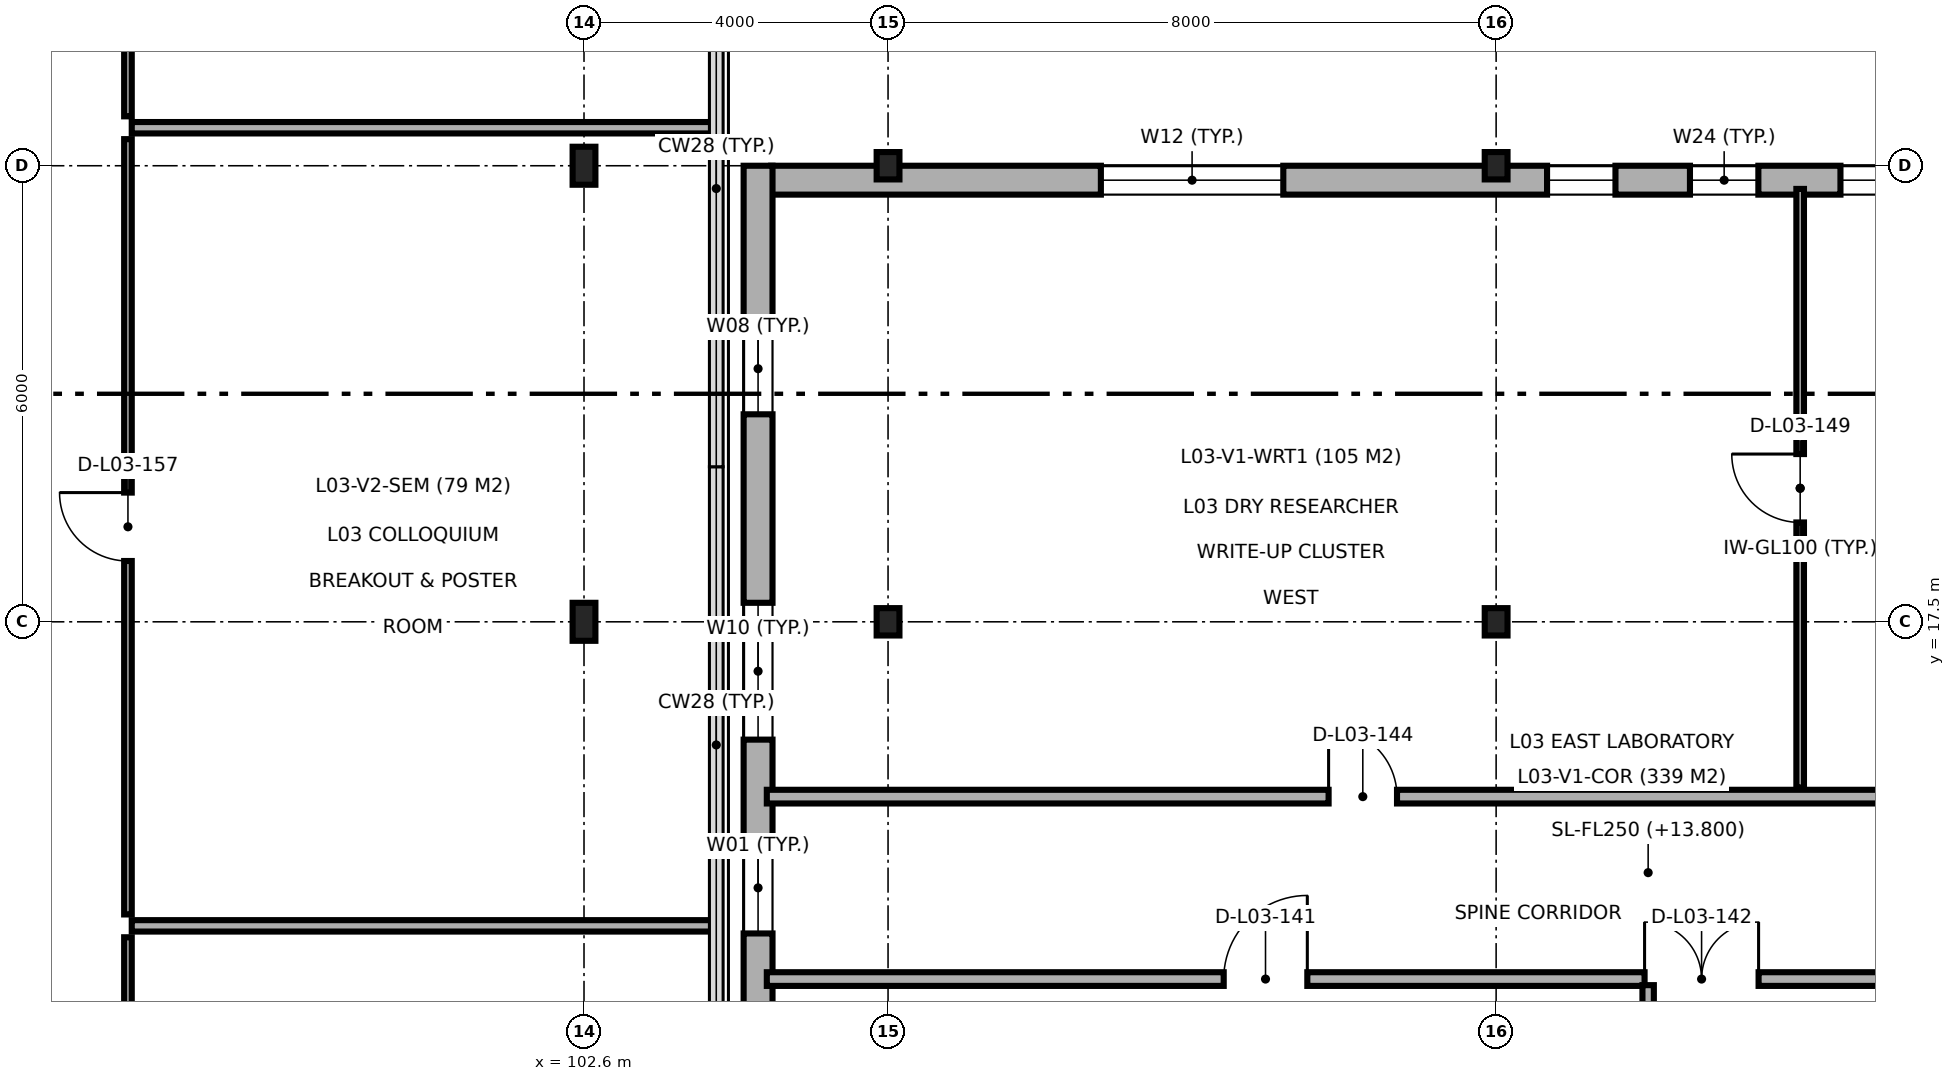
"""IFC4 building model, lengths in metres.
Left out: names, types, materials, properties, quantities, classifications, styles, units other than length and angle.
Written with IfcOpenShell. Run it as: python <this file> out.ifc"""

import sys

from ifc_helpers import new_model, si_unit, direction, frame, frame_2d, origin, origin_2d, place, context, subcontext, project, spatial, rectangle, i_section, extrude, element, fill, save


model = new_model("IFC4")
c1 = context("Model", 3, precision=1e-05, world=origin(), true_north=direction((0.0, 1.0)))
c2 = subcontext(c1, "Body", "Model", "MODEL_VIEW")
j1 = project(units=[si_unit("LENGTHUNIT", "METRE"), si_unit("PLANEANGLEUNIT", "RADIAN")], contexts=[c1])
p1 = place(None, origin())
s1 = spatial("IfcSite", under=j1, at=p1, CompositionType="ELEMENT")
p2 = place(p1, origin())
s2 = spatial("IfcBuilding", under=s1, at=p2, CompositionType="ELEMENT")
p3 = place(p2, frame((0.0, 0.0, 13.8)))
s3 = spatial("IfcBuildingStorey", under=s2, at=p3, CompositionType="ELEMENT", Elevation=13.8)
p4 = place(p3, frame((102.6, 17.5, 0.0), z_axis=(0.0, 0.0, 1.0), x_axis=(1.0, 0.0, 0.0)))
e1 = element("IfcColumn", 1, at=p4, inside=s3, PredefinedType="COLUMN", context=c2, shape_type="SweptSolid", body=[
    extrude(i_section(OverallWidth=0.3, OverallDepth=0.5, WebThickness=0.014, FlangeThickness=0.028, FilletRadius=0.027, at=origin_2d()), origin(), (0.0, 0.0, 1.0), 6.318),
])
p5 = place(p3, frame((102.6, 23.5, 0.0), z_axis=(0.0, 0.0, 1.0), x_axis=(1.0, 0.0, 0.0)))
e2 = element("IfcColumn", 2, at=p5, inside=s3, PredefinedType="COLUMN", context=c2, shape_type="SweptSolid", body=[
    extrude(i_section(OverallWidth=0.3, OverallDepth=0.5, WebThickness=0.014, FlangeThickness=0.028, FilletRadius=0.027, at=origin_2d()), origin(), (0.0, 0.0, 1.0), 6.978),
])
for number, where, z_axis, x_axis in (
    (3, (106.6, 17.5, 0.0), (0.0, 0.0, 1.0), (1.0, 0.0, 0.0)),
    (4, (106.6, 23.5, 0.0), (0.0, 0.0, 1.0), (1.0, 0.0, 0.0)),
    (5, (114.6, 17.5, 0.0), (0.0, 0.0, 1.0), (1.0, 0.0, 0.0)),
    (6, (114.6, 23.5, 0.0), (0.0, 0.0, 1.0), (1.0, 0.0, 0.0)),
):
    element("IfcColumn", number, at=place(p3, frame(where, z_axis=z_axis, x_axis=x_axis)), inside=s3, PredefinedType="COLUMN", context=c2, shape_type="SweptSolid", body=[
        extrude(i_section(OverallWidth=0.3, OverallDepth=0.36, WebThickness=0.012, FlangeThickness=0.022, FilletRadius=0.027, at=origin_2d()), origin(), (0.0, 0.0, 1.0), 4.5),
    ])
p6 = place(p3, frame((138.962, 23.31, 0.0), z_axis=(0.0, 0.0, 1.0), x_axis=(-1.0, 0.0, 0.0)))
e7 = element("IfcWall", 7, at=p6, inside=s3, PredefinedType="SOLIDWALL", context=c2, shape_type="SweptSolid", body=[
    extrude(rectangle(XDim=33.9, YDim=0.38, at=frame_2d((16.95, 0.0))), origin(), (0.0, 0.0, 1.0), 4.24),
])
p7 = place(p6, frame((3.182, 0.0, 0.9)))
e8 = element("IfcOpeningElement", 8, at=p7, cuts=e7, PredefinedType="OPENING", context=c2, shape_type="SweptSolid", body=[
    extrude(rectangle(XDim=2.2, YDim=1.65, at=frame_2d((1.1, 0.825))), frame((0.0, 0.2, 0.0), z_axis=(0.0, -1.0, 0.0), x_axis=(1.0, 0.0, 0.0)), (0.0, 0.0, 1.0), 0.4),
])
p8 = place(p6, frame((9.032, 0.0, 0.9)))
e9 = element("IfcOpeningElement", 9, at=p8, cuts=e7, PredefinedType="OPENING", context=c2, shape_type="SweptSolid", body=[
    extrude(rectangle(XDim=0.9, YDim=1.8, at=frame_2d((0.45, 0.9))), frame((0.0, 0.2, 0.0), z_axis=(0.0, -1.0, 0.0), x_axis=(1.0, 0.0, 0.0)), (0.0, 0.0, 1.0), 0.4),
])
p9 = place(p6, frame((12.192, 0.0, 0.9)))
e10 = element("IfcOpeningElement", 10, at=p9, cuts=e7, PredefinedType="OPENING", context=c2, shape_type="SweptSolid", body=[
    extrude(rectangle(XDim=2.1, YDim=1.8, at=frame_2d((1.05, 0.9))), frame((0.0, 0.2, 0.0), z_axis=(0.0, -1.0, 0.0), x_axis=(1.0, 0.0, 0.0)), (0.0, 0.0, 1.0), 0.4),
])
p10 = place(p6, frame((17.132, 0.0, 0.9)))
e11 = element("IfcOpeningElement", 11, at=p10, cuts=e7, PredefinedType="OPENING", context=c2, shape_type="SweptSolid", body=[
    extrude(rectangle(XDim=2.7, YDim=1.8, at=frame_2d((1.35, 0.9))), frame((0.0, 0.2, 0.0), z_axis=(0.0, -1.0, 0.0), x_axis=(1.0, 0.0, 0.0)), (0.0, 0.0, 1.0), 0.4),
])
p11 = place(p6, frame((20.912, 0.0, 0.9)))
e12 = element("IfcOpeningElement", 12, at=p11, cuts=e7, PredefinedType="OPENING", context=c2, shape_type="SweptSolid", body=[
    extrude(rectangle(XDim=0.9, YDim=1.8, at=frame_2d((0.45, 0.9))), frame((0.0, 0.2, 0.0), z_axis=(0.0, -1.0, 0.0), x_axis=(1.0, 0.0, 0.0)), (0.0, 0.0, 1.0), 0.4),
])
p12 = place(p6, frame((22.792, 0.0, 0.9)))
e13 = element("IfcOpeningElement", 13, at=p12, cuts=e7, PredefinedType="OPENING", context=c2, shape_type="SweptSolid", body=[
    extrude(rectangle(XDim=0.9, YDim=1.8, at=frame_2d((0.45, 0.9))), frame((0.0, 0.2, 0.0), z_axis=(0.0, -1.0, 0.0), x_axis=(1.0, 0.0, 0.0)), (0.0, 0.0, 1.0), 0.4),
])
p13 = place(p6, frame((27.162, 0.0, 0.9)))
e14 = element("IfcOpeningElement", 14, at=p13, cuts=e7, PredefinedType="OPENING", context=c2, shape_type="SweptSolid", body=[
    extrude(rectangle(XDim=2.4, YDim=2.1, at=frame_2d((1.2, 1.05))), frame((0.0, 0.2, 0.0), z_axis=(0.0, -1.0, 0.0), x_axis=(1.0, 0.0, 0.0)), (0.0, 0.0, 1.0), 0.4),
])
p14 = place(p3, frame((104.89, 23.5, 0.0), z_axis=(0.0, 0.0, 1.0), x_axis=(0.0, -1.0, 0.0)))
e15 = element("IfcWall", 15, at=p14, inside=s3, PredefinedType="SOLIDWALL", context=c2, shape_type="SweptSolid", body=[
    extrude(rectangle(XDim=18.6, YDim=0.38, at=frame_2d((9.3, 0.0))), origin(), (0.0, 0.0, 1.0), 4.24),
])
p15 = place(p14, frame((2.07, 0.0, 0.9)))
e16 = element("IfcOpeningElement", 16, at=p15, cuts=e15, PredefinedType="OPENING", context=c2, shape_type="SweptSolid", body=[
    extrude(rectangle(XDim=1.2, YDim=2.1, at=frame_2d((0.6, 1.05))), frame((0.0, 0.2, 0.0), z_axis=(0.0, -1.0, 0.0), x_axis=(1.0, 0.0, 0.0)), (0.0, 0.0, 1.0), 0.4),
])
p16 = place(p14, frame((5.75, 0.0, 0.9)))
e17 = element("IfcOpeningElement", 17, at=p16, cuts=e15, PredefinedType="OPENING", context=c2, shape_type="SweptSolid", body=[
    extrude(rectangle(XDim=1.8, YDim=2.1, at=frame_2d((0.9, 1.05))), frame((0.0, 0.2, 0.0), z_axis=(0.0, -1.0, 0.0), x_axis=(1.0, 0.0, 0.0)), (0.0, 0.0, 1.0), 0.4),
])
p17 = place(p14, frame((8.9, 0.0, 0.9)))
e18 = element("IfcOpeningElement", 18, at=p17, cuts=e15, PredefinedType="OPENING", context=c2, shape_type="SweptSolid", body=[
    extrude(rectangle(XDim=1.2, YDim=1.8, at=frame_2d((0.6, 0.9))), frame((0.0, 0.2, 0.0), z_axis=(0.0, -1.0, 0.0), x_axis=(1.0, 0.0, 0.0)), (0.0, 0.0, 1.0), 0.4),
])
p18 = place(p14, frame((12.98, 0.0, 0.9)))
e19 = element("IfcOpeningElement", 19, at=p18, cuts=e15, PredefinedType="OPENING", context=c2, shape_type="SweptSolid", body=[
    extrude(rectangle(XDim=3.0, YDim=2.1, at=frame_2d((1.5, 1.05))), frame((0.0, 0.2, 0.0), z_axis=(0.0, -1.0, 0.0), x_axis=(1.0, 0.0, 0.0)), (0.0, 0.0, 1.0), 0.4),
])
p19 = place(p3, frame((105.005, 12.8, 0.0), z_axis=(0.0, 0.0, 1.0), x_axis=(1.0, 0.0, 0.0)))
e20 = element("IfcWall", 20, at=p19, inside=s3, PredefinedType="PARTITIONING", context=c2, shape_type="SweptSolid", body=[
    extrude(rectangle(XDim=34.495, YDim=0.18, at=frame_2d((17.248, 0.0))), origin(), (0.0, 0.0, 1.0), 4.25),
])
p20 = place(p19, frame((6.011, 0.0, 0.0)))
e21 = element("IfcOpeningElement", 21, at=p20, cuts=e20, PredefinedType="OPENING", context=c2, shape_type="SweptSolid", body=[
    extrude(rectangle(XDim=1.1, YDim=2.15, at=frame_2d((0.55, 1.075))), frame((0.0, 0.1, 0.0), z_axis=(0.0, -1.0, 0.0), x_axis=(1.0, 0.0, 0.0)), (0.0, 0.0, 1.0), 0.2),
])
p21 = place(p19, frame((11.548, 0.0, 0.0)))
e22 = element("IfcOpeningElement", 22, at=p21, cuts=e20, PredefinedType="OPENING", context=c2, shape_type="SweptSolid", body=[
    extrude(rectangle(XDim=1.5, YDim=2.2, at=frame_2d((0.75, 1.1))), frame((0.0, 0.1, 0.0), z_axis=(0.0, -1.0, 0.0), x_axis=(1.0, 0.0, 0.0)), (0.0, 0.0, 1.0), 0.2),
])
p22 = place(p19, frame((27.548, 0.0, 0.0)))
e23 = element("IfcOpeningElement", 23, at=p22, cuts=e20, PredefinedType="OPENING", context=c2, shape_type="SweptSolid", body=[
    extrude(rectangle(XDim=0.9, YDim=2.1, at=frame_2d((0.45, 1.05))), frame((0.0, 0.1, 0.0), z_axis=(0.0, -1.0, 0.0), x_axis=(1.0, 0.0, 0.0)), (0.0, 0.0, 1.0), 0.2),
])
p23 = place(p3, frame((105.005, 15.2, 0.0), z_axis=(0.0, 0.0, 1.0), x_axis=(1.0, 0.0, 0.0)))
e24 = element("IfcWall", 24, at=p23, inside=s3, PredefinedType="PARTITIONING", context=c2, shape_type="SweptSolid", body=[
    extrude(rectangle(XDim=34.495, YDim=0.18, at=frame_2d((17.248, 0.0))), origin(), (0.0, 0.0, 1.0), 4.25),
])
p24 = place(p23, frame((7.391, 0.0, 0.0)))
e25 = element("IfcOpeningElement", 25, at=p24, cuts=e24, PredefinedType="OPENING", context=c2, shape_type="SweptSolid", body=[
    extrude(rectangle(XDim=0.9, YDim=2.1, at=frame_2d((0.45, 1.05))), frame((0.0, 0.1, 0.0), z_axis=(0.0, -1.0, 0.0), x_axis=(1.0, 0.0, 0.0)), (0.0, 0.0, 1.0), 0.2),
])
p25 = place(p23, frame((18.45, 0.0, 0.0)))
e26 = element("IfcOpeningElement", 26, at=p25, cuts=e24, PredefinedType="OPENING", context=c2, shape_type="SweptSolid", body=[
    extrude(rectangle(XDim=0.95, YDim=2.1, at=frame_2d((0.475, 1.05))), frame((0.0, 0.1, 0.0), z_axis=(0.0, -1.0, 0.0), x_axis=(1.0, 0.0, 0.0)), (0.0, 0.0, 1.0), 0.2),
])
p26 = place(p23, frame((27.466, 0.0, 0.0)))
e27 = element("IfcOpeningElement", 27, at=p26, cuts=e24, PredefinedType="OPENING", context=c2, shape_type="SweptSolid", body=[
    extrude(rectangle(XDim=1.0, YDim=2.15, at=frame_2d((0.5, 1.075))), frame((0.0, 0.1, 0.0), z_axis=(0.0, -1.0, 0.0), x_axis=(1.0, 0.0, 0.0)), (0.0, 0.0, 1.0), 0.2),
])
p27 = place(p3, frame((116.6, 5.205, 0.0), z_axis=(0.0, 0.0, 1.0), x_axis=(0.0, 1.0, 0.0)))
e28 = element("IfcWall", 28, at=p27, inside=s3, PredefinedType="PARTITIONING", context=c2, shape_type="SweptSolid", body=[
    extrude(rectangle(XDim=7.515, YDim=0.15, at=frame_2d((3.757, 0.0))), origin(), (0.0, 0.0, 1.0), 4.25),
])
p28 = place(p27, frame((3.258, 0.0, 0.0)))
e29 = element("IfcOpeningElement", 29, at=p28, cuts=e28, PredefinedType="OPENING", context=c2, shape_type="SweptSolid", body=[
    extrude(rectangle(XDim=1.0, YDim=2.15, at=frame_2d((0.5, 1.075))), frame((0.0, 0.085, 0.0), z_axis=(0.0, -1.0, 0.0), x_axis=(1.0, 0.0, 0.0)), (0.0, 0.0, 1.0), 0.17),
])
p29 = place(p3, frame((118.6, 15.32, 0.0), z_axis=(0.0, 0.0, 1.0), x_axis=(0.0, 1.0, 0.0)))
e30 = element("IfcWall", 30, at=p29, inside=s3, PredefinedType="PARTITIONING", context=c2, shape_type="SweptSolid", body=[
    extrude(rectangle(XDim=7.875, YDim=0.1, at=frame_2d((3.938, 0.0))), origin(), (0.0, 0.0, 1.0), 4.25),
])
p30 = place(p29, frame((3.487, 0.0, 0.0)))
e31 = element("IfcOpeningElement", 31, at=p30, cuts=e30, PredefinedType="OPENING", context=c2, shape_type="SweptSolid", body=[
    extrude(rectangle(XDim=0.9, YDim=2.1, at=frame_2d((0.45, 1.05))), frame((0.0, 0.06, 0.0), z_axis=(0.0, -1.0, 0.0), x_axis=(1.0, 0.0, 0.0)), (0.0, 0.0, 1.0), 0.12),
])
for number, where, z_axis, x_axis in (
    (32, (96.65, 13.5, 0.0), (0.0, 0.0, 1.0), (1.0, 0.0, 0.0)),
    (33, (96.65, 24.0, 0.0), (0.0, 0.0, 1.0), (1.0, 0.0, 0.0)),
):
    element("IfcWall", number, at=place(p3, frame(where, z_axis=z_axis, x_axis=x_axis)), inside=s3, PredefinedType="PARTITIONING", context=c2, shape_type="SweptSolid", body=[
        extrude(rectangle(XDim=7.63, YDim=0.15, at=frame_2d((3.815, 0.0))), origin(), (0.0, 0.0, 1.0), 4.25),
    ])
p31 = place(p3, frame((96.6, 5.75, 0.0), z_axis=(0.0, 0.0, 1.0), x_axis=(0.0, 1.0, 0.0)))
e34 = element("IfcWall", 34, at=p31, inside=s3, PredefinedType="PARTITIONING", context=c2, shape_type="SweptSolid", body=[
    extrude(rectangle(XDim=7.6, YDim=0.1, at=frame_2d((3.8, 0.0))), origin(), (0.0, 0.0, 1.0), 4.25),
])
p32 = place(p31, frame((3.072, 0.0, 0.0)))
e35 = element("IfcOpeningElement", 35, at=p32, cuts=e34, PredefinedType="OPENING", context=c2, shape_type="SweptSolid", body=[
    extrude(rectangle(XDim=0.9, YDim=2.1, at=frame_2d((0.45, 1.05))), frame((0.0, 0.06, 0.0), z_axis=(0.0, -1.0, 0.0), x_axis=(1.0, 0.0, 0.0)), (0.0, 0.0, 1.0), 0.12),
])
p33 = place(p3, frame((96.6, 13.65, 0.0), z_axis=(0.0, 0.0, 1.0), x_axis=(0.0, 1.0, 0.0)))
e36 = element("IfcWall", 36, at=p33, inside=s3, PredefinedType="PARTITIONING", context=c2, shape_type="SweptSolid", body=[
    extrude(rectangle(XDim=10.2, YDim=0.1, at=frame_2d((5.1, 0.0))), origin(), (0.0, 0.0, 1.0), 4.25),
])
p34 = place(p33, frame((4.65, 0.0, 0.0)))
e37 = element("IfcOpeningElement", 37, at=p34, cuts=e36, PredefinedType="OPENING", context=c2, shape_type="SweptSolid", body=[
    extrude(rectangle(XDim=0.9, YDim=2.1, at=frame_2d((0.45, 1.05))), frame((0.0, 0.06, 0.0), z_axis=(0.0, -1.0, 0.0), x_axis=(1.0, 0.0, 0.0)), (0.0, 0.0, 1.0), 0.12),
])
p35 = place(p3, frame((96.6, 24.15, 0.0), z_axis=(0.0, 0.0, 1.0), x_axis=(0.0, 1.0, 0.0)))
e38 = element("IfcWall", 38, at=p35, inside=s3, PredefinedType="PARTITIONING", context=c2, shape_type="SweptSolid", body=[
    extrude(rectangle(XDim=17.1, YDim=0.1, at=frame_2d((8.55, 0.0))), origin(), (0.0, 0.0, 1.0), 4.25),
])
p36 = place(p35, frame((8.089, 0.0, 0.0)))
e39 = element("IfcOpeningElement", 39, at=p36, cuts=e38, PredefinedType="OPENING", context=c2, shape_type="SweptSolid", body=[
    extrude(rectangle(XDim=0.95, YDim=2.1, at=frame_2d((0.475, 1.05))), frame((0.0, 0.06, 0.0), z_axis=(0.0, -1.0, 0.0), x_axis=(1.0, 0.0, 0.0)), (0.0, 0.0, 1.0), 0.12),
])
p37 = place(p10, origin())
e40 = element("IfcWindow", 40, at=p37, inside=s3, PartitioningType="SINGLE_PANEL", PredefinedType="WINDOW", context=c2, shape_type="SweptSolid", body=[
    extrude(rectangle(XDim=2.7, YDim=1.8, at=frame_2d((1.35, 0.9))), frame((0.0, 0.03, 0.0), z_axis=(0.0, -1.0, 0.0), x_axis=(1.0, 0.0, 0.0)), (0.0, 0.0, 1.0), 0.06),
])
fill(e11, e40)
p38 = place(p11, origin())
e41 = element("IfcWindow", 41, at=p38, inside=s3, PartitioningType="SINGLE_PANEL", PredefinedType="WINDOW", context=c2, shape_type="SweptSolid", body=[
    extrude(rectangle(XDim=0.9, YDim=1.8, at=frame_2d((0.45, 0.9))), frame((0.0, 0.03, 0.0), z_axis=(0.0, -1.0, 0.0), x_axis=(1.0, 0.0, 0.0)), (0.0, 0.0, 1.0), 0.06),
])
fill(e12, e41)
p39 = place(p12, origin())
e42 = element("IfcWindow", 42, at=p39, inside=s3, PartitioningType="SINGLE_PANEL", PredefinedType="WINDOW", context=c2, shape_type="SweptSolid", body=[
    extrude(rectangle(XDim=0.9, YDim=1.8, at=frame_2d((0.45, 0.9))), frame((0.0, 0.03, 0.0), z_axis=(0.0, -1.0, 0.0), x_axis=(1.0, 0.0, 0.0)), (0.0, 0.0, 1.0), 0.06),
])
fill(e13, e42)
p40 = place(p13, origin())
e43 = element("IfcWindow", 43, at=p40, inside=s3, PartitioningType="SINGLE_PANEL", PredefinedType="WINDOW", context=c2, shape_type="SweptSolid", body=[
    extrude(rectangle(XDim=2.4, YDim=2.1, at=frame_2d((1.2, 1.05))), frame((0.0, 0.03, 0.0), z_axis=(0.0, -1.0, 0.0), x_axis=(1.0, 0.0, 0.0)), (0.0, 0.0, 1.0), 0.06),
])
fill(e14, e43)
p41 = place(p15, origin())
e44 = element("IfcWindow", 44, at=p41, inside=s3, PartitioningType="SINGLE_PANEL", PredefinedType="WINDOW", context=c2, shape_type="SweptSolid", body=[
    extrude(rectangle(XDim=1.2, YDim=2.1, at=frame_2d((0.6, 1.05))), frame((0.0, 0.03, 0.0), z_axis=(0.0, -1.0, 0.0), x_axis=(1.0, 0.0, 0.0)), (0.0, 0.0, 1.0), 0.06),
])
fill(e16, e44)
p42 = place(p16, origin())
e45 = element("IfcWindow", 45, at=p42, inside=s3, PartitioningType="SINGLE_PANEL", PredefinedType="WINDOW", context=c2, shape_type="SweptSolid", body=[
    extrude(rectangle(XDim=1.8, YDim=2.1, at=frame_2d((0.9, 1.05))), frame((0.0, 0.03, 0.0), z_axis=(0.0, -1.0, 0.0), x_axis=(1.0, 0.0, 0.0)), (0.0, 0.0, 1.0), 0.06),
])
fill(e17, e45)
p43 = place(p17, origin())
e46 = element("IfcWindow", 46, at=p43, inside=s3, PartitioningType="SINGLE_PANEL", PredefinedType="WINDOW", context=c2, shape_type="SweptSolid", body=[
    extrude(rectangle(XDim=1.2, YDim=1.8, at=frame_2d((0.6, 0.9))), frame((0.0, 0.03, 0.0), z_axis=(0.0, -1.0, 0.0), x_axis=(1.0, 0.0, 0.0)), (0.0, 0.0, 1.0), 0.06),
])
fill(e18, e46)
p44 = place(p20, origin())
e47 = element("IfcDoor", 47, at=p44, inside=s3, OperationType="SINGLE_SWING_RIGHT", PredefinedType="DOOR", context=c2, shape_type="SweptSolid", body=[
    extrude(rectangle(XDim=1.1, YDim=2.15, at=frame_2d((0.55, 1.075))), frame((0.0, 0.025, 0.0), z_axis=(0.0, -1.0, 0.0), x_axis=(1.0, 0.0, 0.0)), (0.0, 0.0, 1.0), 0.05),
])
fill(e21, e47)
p45 = place(p21, origin())
e48 = element("IfcDoor", 48, at=p45, inside=s3, OperationType="DOUBLE_DOOR_SINGLE_SWING", PredefinedType="DOOR", context=c2, shape_type="SweptSolid", body=[
    extrude(rectangle(XDim=1.5, YDim=2.2, at=frame_2d((0.75, 1.1))), frame((0.0, 0.025, 0.0), z_axis=(0.0, -1.0, 0.0), x_axis=(1.0, 0.0, 0.0)), (0.0, 0.0, 1.0), 0.05),
])
fill(e22, e48)
p46 = place(p24, origin())
e49 = element("IfcDoor", 49, at=p46, inside=s3, OperationType="SINGLE_SWING_LEFT", PredefinedType="DOOR", context=c2, shape_type="SweptSolid", body=[
    extrude(rectangle(XDim=0.9, YDim=2.1, at=frame_2d((0.45, 1.05))), frame((0.0, 0.025, 0.0), z_axis=(0.0, -1.0, 0.0), x_axis=(1.0, 0.0, 0.0)), (0.0, 0.0, 1.0), 0.05),
])
fill(e25, e49)
p47 = place(p30, origin())
e50 = element("IfcDoor", 50, at=p47, inside=s3, OperationType="SINGLE_SWING_RIGHT", PredefinedType="DOOR", context=c2, shape_type="SweptSolid", body=[
    extrude(rectangle(XDim=0.9, YDim=2.1, at=frame_2d((0.45, 1.05))), frame((0.0, 0.025, 0.0), z_axis=(0.0, -1.0, 0.0), x_axis=(1.0, 0.0, 0.0)), (0.0, 0.0, 1.0), 0.05),
])
fill(e31, e50)
p48 = place(p34, origin())
e51 = element("IfcDoor", 51, at=p48, inside=s3, OperationType="SINGLE_SWING_RIGHT", PredefinedType="DOOR", context=c2, shape_type="SweptSolid", body=[
    extrude(rectangle(XDim=0.9, YDim=2.1, at=frame_2d((0.45, 1.05))), frame((0.0, 0.025, 0.0), z_axis=(0.0, -1.0, 0.0), x_axis=(1.0, 0.0, 0.0)), (0.0, 0.0, 1.0), 0.05),
])
fill(e37, e51)
save(model, sys.argv[1])
